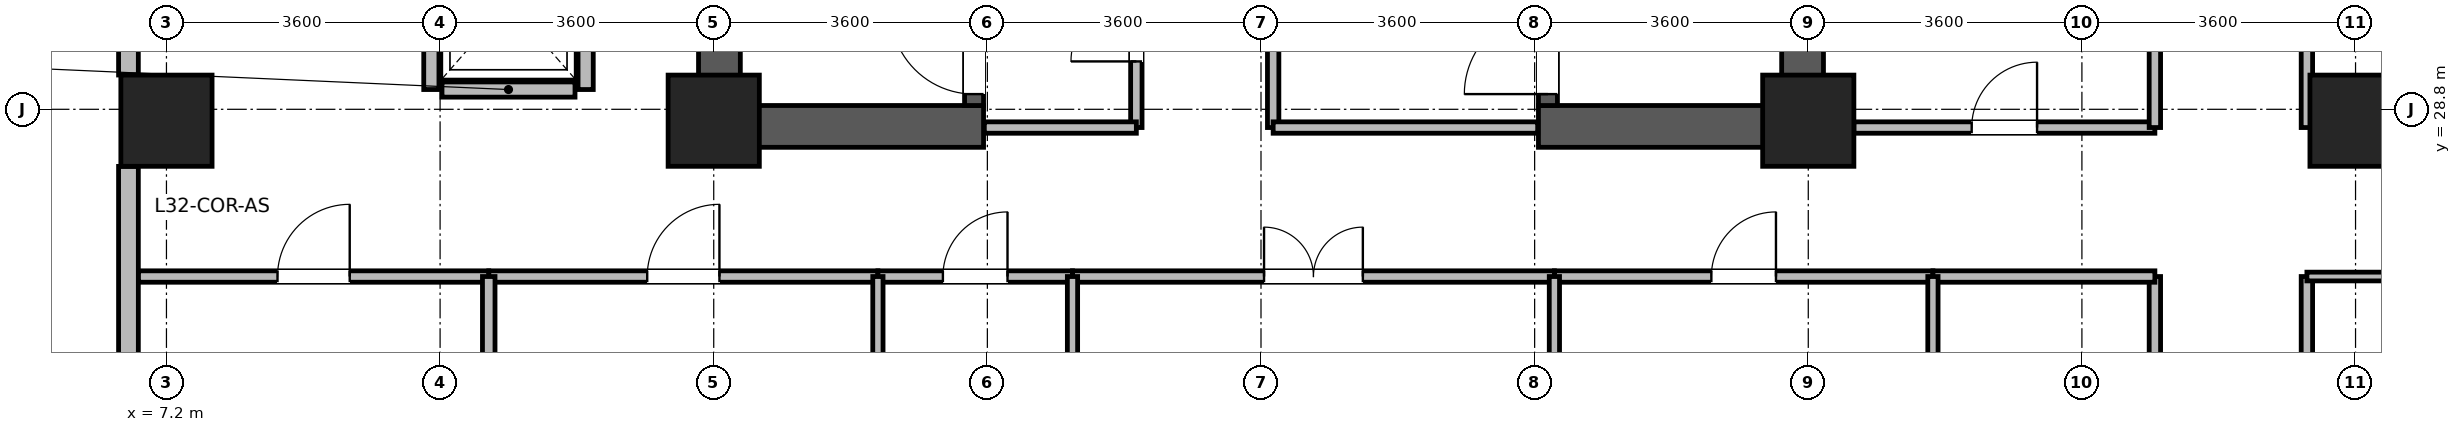
"""IFC4 building model, lengths in metres.
Left out: names, types, materials, properties, quantities, classifications, styles, units other than length and angle.
Written with IfcOpenShell. Run it as: python <this file> out.ifc"""

import sys

from ifc_helpers import new_model, si_unit, direction, frame, frame_2d, origin, origin_2d, place, context, subcontext, project, spatial, rectangle, extrude, source, transform, mapped, element, fill, save


model = new_model("IFC4")
c1 = context("Model", 3, precision=1e-05, world=origin(), true_north=direction((0.0, 1.0)))
c2 = subcontext(c1, "Body", "Model", "MODEL_VIEW")
j1 = project(units=[si_unit("LENGTHUNIT", "METRE"), si_unit("PLANEANGLEUNIT", "RADIAN")], contexts=[c1])
p1 = place(None, origin())
s1 = spatial("IfcSite", under=j1, at=p1, CompositionType="ELEMENT")
p2 = place(p1, origin())
s2 = spatial("IfcBuilding", under=s1, at=p2, CompositionType="ELEMENT")
p3 = place(p2, frame((0.0, 0.0, 126.7)))
s3 = spatial("IfcBuildingStorey", under=s2, at=p3, CompositionType="ELEMENT", Elevation=126.7)
for number, where, z_axis, x_axis in (
    (1, (14.475, 28.3, 0.0), (0.0, 0.0, 1.0), (0.0, 1.0, 0.0)),
    (2, (28.725, 28.3, 0.0), (0.0, 0.0, 1.0), (0.0, 1.0, 0.0)),
):
    element("IfcWall", number, at=place(p3, frame(where, z_axis=z_axis, x_axis=x_axis)), inside=s3, PredefinedType="SHEAR", context=c2, shape_type="SweptSolid", body=[
        extrude(rectangle(XDim=8.1, YDim=0.55, at=frame_2d((4.05, 0.0))), origin(), (0.0, 0.0, 1.0), 3.34),
    ])
for number, where, z_axis, x_axis in (
    (3, (14.75, 28.575, 0.0), (0.0, 0.0, 1.0), (1.0, 0.0, 0.0)),
    (4, (25.25, 28.575, 0.0), (0.0, 0.0, 1.0), (1.0, 0.0, 0.0)),
):
    element("IfcWall", number, at=place(p3, frame(where, z_axis=z_axis, x_axis=x_axis)), inside=s3, PredefinedType="SHEAR", context=c2, shape_type="SweptSolid", body=[
        extrude(rectangle(XDim=3.2, YDim=0.55, at=frame_2d((1.6, 0.0))), origin(), (0.0, 0.0, 1.0), 3.34),
    ])
p4 = place(p3, frame((17.825, 28.85, 0.0), z_axis=(0.0, 0.0, 1.0), x_axis=(0.0, 1.0, 0.0)))
e5 = element("IfcWall", 5, at=p4, inside=s3, PredefinedType="SHEAR", context=c2, shape_type="SweptSolid", body=[
    extrude(rectangle(XDim=7.0, YDim=0.25, at=frame_2d((3.5, 0.0))), origin(), (0.0, 0.0, 1.0), 3.34),
])
p5 = place(p4, frame((0.15, 0.0, 0.0)))
e6 = element("IfcOpeningElement", 6, at=p5, cuts=e5, PredefinedType="OPENING", context=c2, shape_type="SweptSolid", body=[
    extrude(rectangle(XDim=1.1, YDim=2.08, at=frame_2d((0.55, 1.04))), frame((0.0, 0.135, 0.0), z_axis=(0.0, -1.0, 0.0), x_axis=(1.0, 0.0, 0.0)), (0.0, 0.0, 1.0), 0.27),
])
p6 = place(p3, frame((25.375, 28.85, 0.0), z_axis=(0.0, 0.0, 1.0), x_axis=(0.0, 1.0, 0.0)))
e7 = element("IfcWall", 7, at=p6, inside=s3, PredefinedType="SHEAR", context=c2, shape_type="SweptSolid", body=[
    extrude(rectangle(XDim=7.0, YDim=0.25, at=frame_2d((3.5, 0.0))), origin(), (0.0, 0.0, 1.0), 3.34),
])
p7 = place(p6, frame((0.15, 0.0, 0.0)))
e8 = element("IfcOpeningElement", 8, at=p7, cuts=e7, PredefinedType="OPENING", context=c2, shape_type="SweptSolid", body=[
    extrude(rectangle(XDim=1.1, YDim=2.08, at=frame_2d((0.55, 1.04))), frame((0.0, 0.135, 0.0), z_axis=(0.0, -1.0, 0.0), x_axis=(1.0, 0.0, 0.0)), (0.0, 0.0, 1.0), 0.27),
])
m1 = source(origin(), c2, "Body", "SweptSolid", [
    extrude(rectangle(XDim=1.2, YDim=1.2, at=origin_2d()), origin(), (0.0, 0.0, 1.0), 3.7),
])
for number, where, z_axis, x_axis in (
    (9, (7.2, 28.65, 0.0), (0.0, 0.0, 1.0), (1.0, 0.0, 0.0)),
    (10, (14.4, 28.65, 0.0), (0.0, 0.0, 1.0), (1.0, 0.0, 0.0)),
    (11, (28.8, 28.65, 0.0), (0.0, 0.0, 1.0), (1.0, 0.0, 0.0)),
    (12, (36.0, 28.65, 0.0), (0.0, 0.0, 1.0), (1.0, 0.0, 0.0)),
):
    element("IfcColumn", number, at=place(p3, frame(where, z_axis=z_axis, x_axis=x_axis)), inside=s3, PredefinedType="COLUMN", context=c2, shape_type="MappedRepresentation", body=[
        mapped(m1, transform((0.0, 0.0, 0.0), x_axis=(1.0, 0.0, 0.0), y_axis=(0.0, 1.0, 0.0), z_axis=(0.0, 0.0, 1.0), scale=1.0)),
    ])
p8 = place(p3, frame((6.7, 29.251, 0.0), z_axis=(0.0, 0.0, 1.0), x_axis=(0.0, 1.0, 0.0)))
e13 = element("IfcWall", 13, at=p8, inside=s3, PredefinedType="STANDARD", context=c2, shape_type="SweptSolid", body=[
    extrude(rectangle(XDim=6.298, YDim=0.26, at=frame_2d((3.149, 0.0))), origin(), (0.0, 0.0, 1.0), 3.32),
])
p9 = place(p8, frame((0.824, 0.0, 0.85)))
e14 = element("IfcOpeningElement", 14, at=p9, cuts=e13, PredefinedType="OPENING", context=c2, shape_type="SweptSolid", body=[
    extrude(rectangle(XDim=1.5, YDim=1.85, at=frame_2d((0.75, 0.925))), frame((0.0, 0.14, 0.0), z_axis=(0.0, -1.0, 0.0), x_axis=(1.0, 0.0, 0.0)), (0.0, 0.0, 1.0), 0.28),
])
p10 = place(p8, frame((3.973, 0.0, 0.85)))
e15 = element("IfcOpeningElement", 15, at=p10, cuts=e13, PredefinedType="OPENING", context=c2, shape_type="SweptSolid", body=[
    extrude(rectangle(XDim=1.5, YDim=1.85, at=frame_2d((0.75, 0.925))), frame((0.0, 0.14, 0.0), z_axis=(0.0, -1.0, 0.0), x_axis=(1.0, 0.0, 0.0)), (0.0, 0.0, 1.0), 0.28),
])
p11 = place(p3, frame((6.7, 21.47, 0.0), z_axis=(0.0, 0.0, 1.0), x_axis=(0.0, 1.0, 0.0)))
e16 = element("IfcWall", 16, at=p11, inside=s3, PredefinedType="STANDARD", context=c2, shape_type="SweptSolid", body=[
    extrude(rectangle(XDim=6.579, YDim=0.26, at=frame_2d((3.29, 0.0))), origin(), (0.0, 0.0, 1.0), 3.32),
])
p12 = place(p11, frame((0.895, 0.0, 0.85)))
e17 = element("IfcOpeningElement", 17, at=p12, cuts=e16, PredefinedType="OPENING", context=c2, shape_type="SweptSolid", body=[
    extrude(rectangle(XDim=1.5, YDim=1.85, at=frame_2d((0.75, 0.925))), frame((0.0, 0.14, 0.0), z_axis=(0.0, -1.0, 0.0), x_axis=(1.0, 0.0, 0.0)), (0.0, 0.0, 1.0), 0.28),
])
p13 = place(p11, frame((2.814, 0.0, 0.85)))
e18 = element("IfcOpeningElement", 18, at=p13, cuts=e16, PredefinedType="OPENING", context=c2, shape_type="SweptSolid", body=[
    extrude(rectangle(XDim=0.95, YDim=1.75, at=frame_2d((0.475, 0.875))), frame((0.0, 0.14, 0.0), z_axis=(0.0, -1.0, 0.0), x_axis=(1.0, 0.0, 0.0)), (0.0, 0.0, 1.0), 0.28),
])
p14 = place(p3, frame((10.825, 29.06, 0.0), z_axis=(0.0, 0.0, 1.0), x_axis=(1.0, 0.0, 0.0)))
e19 = element("IfcWall", 19, at=p14, inside=s3, PredefinedType="PARTITIONING", context=c2, shape_type="SweptSolid", body=[
    extrude(rectangle(XDim=1.75, YDim=0.2, at=frame_2d((0.875, 0.0))), origin(), (0.0, 0.0, 1.0), 3.32),
])
for number, where, z_axis, x_axis in (
    (20, (10.685, 29.06, 0.0), (0.0, 0.0, 1.0), (0.0, 1.0, 0.0)),
    (21, (12.715, 29.06, 0.0), (0.0, 0.0, 1.0), (0.0, 1.0, 0.0)),
):
    element("IfcWall", number, at=place(p3, frame(where, z_axis=z_axis, x_axis=x_axis)), inside=s3, PredefinedType="PARTITIONING", context=c2, shape_type="SweptSolid", body=[
        extrude(rectangle(XDim=2.28, YDim=0.2, at=frame_2d((1.14, 0.0))), origin(), (0.0, 0.0, 1.0), 3.32),
    ])
p15 = place(p3, frame((35.36, 16.96, 0.0), z_axis=(0.0, 0.0, 1.0), x_axis=(0.0, 1.0, 0.0)))
e22 = element("IfcWall", 22, at=p15, inside=s3, PredefinedType="PARTITIONING", context=c2, shape_type="SweptSolid", body=[
    extrude(rectangle(XDim=9.64, YDim=0.15, at=frame_2d((4.82, 0.0))), origin(), (0.0, 0.0, 1.0), 3.32),
])
p16 = place(p15, frame((2.435, 0.0, 0.0)))
e23 = element("IfcOpeningElement", 23, at=p16, cuts=e22, PredefinedType="OPENING", context=c2, shape_type="SweptSolid", body=[
    extrude(rectangle(XDim=1.3, YDim=2.12, at=frame_2d((0.65, 1.06))), frame((0.0, 0.085, 0.0), z_axis=(0.0, -1.0, 0.0), x_axis=(1.0, 0.0, 0.0)), (0.0, 0.0, 1.0), 0.17),
])
p17 = place(p3, frame((35.36, 28.56, 0.0), z_axis=(0.0, 0.0, 1.0), x_axis=(0.0, 1.0, 0.0)))
e24 = element("IfcWall", 24, at=p17, inside=s3, PredefinedType="PARTITIONING", context=c2, shape_type="SweptSolid", body=[
    extrude(rectangle(XDim=7.68, YDim=0.15, at=frame_2d((3.84, 0.0))), origin(), (0.0, 0.0, 1.0), 3.32),
])
p18 = place(p17, frame((3.19, 0.0, 0.0)))
e25 = element("IfcOpeningElement", 25, at=p18, cuts=e24, PredefinedType="OPENING", context=c2, shape_type="SweptSolid", body=[
    extrude(rectangle(XDim=1.3, YDim=2.12, at=frame_2d((0.65, 1.06))), frame((0.0, 0.085, 0.0), z_axis=(0.0, -1.0, 0.0), x_axis=(1.0, 0.0, 0.0)), (0.0, 0.0, 1.0), 0.17),
])
p19 = place(p3, frame((19.12, 26.6, 0.0), z_axis=(0.0, 0.0, 1.0), x_axis=(1.0, 0.0, 0.0)))
e26 = element("IfcWall", 26, at=p19, inside=s3, PredefinedType="PARTITIONING", context=c2, shape_type="SweptSolid", body=[
    extrude(rectangle(XDim=6.34, YDim=0.15, at=frame_2d((3.17, 0.0))), origin(), (0.0, 0.0, 1.0), 3.32),
])
p20 = place(p19, frame((2.52, 0.0, 0.0)))
e27 = element("IfcOpeningElement", 27, at=p20, cuts=e26, PredefinedType="OPENING", context=c2, shape_type="SweptSolid", body=[
    extrude(rectangle(XDim=1.3, YDim=2.12, at=frame_2d((0.65, 1.06))), frame((0.0, 0.085, 0.0), z_axis=(0.0, -1.0, 0.0), x_axis=(1.0, 0.0, 0.0)), (0.0, 0.0, 1.0), 0.17),
])
p21 = place(p3, frame((11.44, 26.6, 0.0), z_axis=(0.0, 0.0, 1.0), x_axis=(1.0, 0.0, 0.0)))
e28 = element("IfcWall", 28, at=p21, inside=s3, PredefinedType="PARTITIONING", context=c2, shape_type="SweptSolid", body=[
    extrude(rectangle(XDim=5.12, YDim=0.15, at=frame_2d((2.56, 0.0))), origin(), (0.0, 0.0, 1.0), 3.32),
])
p22 = place(p21, frame((2.085, 0.0, 0.0)))
e29 = element("IfcOpeningElement", 29, at=p22, cuts=e28, PredefinedType="OPENING", context=c2, shape_type="SweptSolid", body=[
    extrude(rectangle(XDim=0.95, YDim=2.1, at=frame_2d((0.475, 1.05))), frame((0.0, 0.085, 0.0), z_axis=(0.0, -1.0, 0.0), x_axis=(1.0, 0.0, 0.0)), (0.0, 0.0, 1.0), 0.17),
])
p23 = place(p3, frame((33.36, 21.6, 0.0), z_axis=(0.0, 0.0, 1.0), x_axis=(0.0, 1.0, 0.0)))
e30 = element("IfcWall", 30, at=p23, inside=s3, PredefinedType="PARTITIONING", context=c2, shape_type="SweptSolid", body=[
    extrude(rectangle(XDim=5.0, YDim=0.15, at=frame_2d((2.5, 0.0))), origin(), (0.0, 0.0, 1.0), 3.32),
])
p24 = place(p23, frame((2.07, 0.0, 0.0)))
e31 = element("IfcOpeningElement", 31, at=p24, cuts=e30, PredefinedType="OPENING", context=c2, shape_type="SweptSolid", body=[
    extrude(rectangle(XDim=0.86, YDim=2.02, at=frame_2d((0.43, 1.01))), frame((0.0, 0.085, 0.0), z_axis=(0.0, -1.0, 0.0), x_axis=(1.0, 0.0, 0.0)), (0.0, 0.0, 1.0), 0.17),
])
p25 = place(p3, frame((25.46, 26.6, 0.0), z_axis=(0.0, 0.0, 1.0), x_axis=(1.0, 0.0, 0.0)))
e32 = element("IfcWall", 32, at=p25, inside=s3, PredefinedType="PARTITIONING", context=c2, shape_type="SweptSolid", body=[
    extrude(rectangle(XDim=4.98, YDim=0.15, at=frame_2d((2.49, 0.0))), origin(), (0.0, 0.0, 1.0), 3.32),
])
p26 = place(p25, frame((2.065, 0.0, 0.0)))
e33 = element("IfcOpeningElement", 33, at=p26, cuts=e32, PredefinedType="OPENING", context=c2, shape_type="SweptSolid", body=[
    extrude(rectangle(XDim=0.85, YDim=2.04, at=frame_2d((0.425, 1.02))), frame((0.0, 0.085, 0.0), z_axis=(0.0, -1.0, 0.0), x_axis=(1.0, 0.0, 0.0)), (0.0, 0.0, 1.0), 0.17),
])
p27 = place(p3, frame((6.832, 26.6, 0.0), z_axis=(0.0, 0.0, 1.0), x_axis=(1.0, 0.0, 0.0)))
e34 = element("IfcWall", 34, at=p27, inside=s3, PredefinedType="PARTITIONING", context=c2, shape_type="SweptSolid", body=[
    extrude(rectangle(XDim=4.608, YDim=0.15, at=frame_2d((2.304, 0.0))), origin(), (0.0, 0.0, 1.0), 3.32),
])
p28 = place(p27, frame((1.829, 0.0, 0.0)))
e35 = element("IfcOpeningElement", 35, at=p28, cuts=e34, PredefinedType="OPENING", context=c2, shape_type="SweptSolid", body=[
    extrude(rectangle(XDim=0.95, YDim=2.1, at=frame_2d((0.475, 1.05))), frame((0.0, 0.085, 0.0), z_axis=(0.0, -1.0, 0.0), x_axis=(1.0, 0.0, 0.0)), (0.0, 0.0, 1.0), 0.17),
])
p29 = place(p3, frame((29.4, 28.56, 0.0), z_axis=(0.0, 0.0, 1.0), x_axis=(1.0, 0.0, 0.0)))
e36 = element("IfcWall", 36, at=p29, inside=s3, PredefinedType="PARTITIONING", context=c2, shape_type="SweptSolid", body=[
    extrude(rectangle(XDim=3.96, YDim=0.15, at=frame_2d((1.98, 0.0))), origin(), (0.0, 0.0, 1.0), 2.67),
])
p30 = place(p29, frame((1.55, 0.0, 0.0)))
e37 = element("IfcOpeningElement", 37, at=p30, cuts=e36, PredefinedType="OPENING", context=c2, shape_type="SweptSolid", body=[
    extrude(rectangle(XDim=0.86, YDim=2.02, at=frame_2d((0.43, 1.01))), frame((0.0, 0.085, 0.0), z_axis=(0.0, -1.0, 0.0), x_axis=(1.0, 0.0, 0.0)), (0.0, 0.0, 1.0), 0.17),
])
p31 = place(p3, frame((33.36, 28.56, 0.0), z_axis=(0.0, 0.0, 1.0), x_axis=(0.0, 1.0, 0.0)))
e38 = element("IfcWall", 38, at=p31, inside=s3, PredefinedType="PARTITIONING", context=c2, shape_type="SweptSolid", body=[
    extrude(rectangle(XDim=3.84, YDim=0.15, at=frame_2d((1.92, 0.0))), origin(), (0.0, 0.0, 1.0), 3.32),
])
p32 = place(p3, frame((30.44, 26.6, 0.0), z_axis=(0.0, 0.0, 1.0), x_axis=(1.0, 0.0, 0.0)))
e39 = element("IfcWall", 39, at=p32, inside=s3, PredefinedType="PARTITIONING", context=c2, shape_type="SweptSolid", body=[
    extrude(rectangle(XDim=2.92, YDim=0.15, at=frame_2d((1.46, 0.0))), origin(), (0.0, 0.0, 1.0), 3.32),
])
p33 = place(p3, frame((19.96, 28.56, 0.0), z_axis=(0.0, 0.0, 1.0), x_axis=(0.0, 1.0, 0.0)))
e40 = element("IfcWall", 40, at=p33, inside=s3, PredefinedType="PARTITIONING", context=c2, shape_type="SweptSolid", body=[
    extrude(rectangle(XDim=2.6, YDim=0.15, at=frame_2d((1.3, 0.0))), origin(), (0.0, 0.0, 1.0), 3.32),
])
p34 = place(p33, frame((0.87, 0.0, 0.0)))
e41 = element("IfcOpeningElement", 41, at=p34, cuts=e40, PredefinedType="OPENING", context=c2, shape_type="SweptSolid", body=[
    extrude(rectangle(XDim=0.86, YDim=2.02, at=frame_2d((0.43, 1.01))), frame((0.0, 0.085, 0.0), z_axis=(0.0, -1.0, 0.0), x_axis=(1.0, 0.0, 0.0)), (0.0, 0.0, 1.0), 0.17),
])
p35 = place(p3, frame((16.56, 26.6, 0.0), z_axis=(0.0, 0.0, 1.0), x_axis=(1.0, 0.0, 0.0)))
e42 = element("IfcWall", 42, at=p35, inside=s3, PredefinedType="PARTITIONING", context=c2, shape_type="SweptSolid", body=[
    extrude(rectangle(XDim=2.56, YDim=0.15, at=frame_2d((1.28, 0.0))), origin(), (0.0, 0.0, 1.0), 3.32),
])
p36 = place(p35, frame((0.855, 0.0, 0.0)))
e43 = element("IfcOpeningElement", 43, at=p36, cuts=e42, PredefinedType="OPENING", context=c2, shape_type="SweptSolid", body=[
    extrude(rectangle(XDim=0.85, YDim=2.04, at=frame_2d((0.425, 1.02))), frame((0.0, 0.085, 0.0), z_axis=(0.0, -1.0, 0.0), x_axis=(1.0, 0.0, 0.0)), (0.0, 0.0, 1.0), 0.17),
])
p37 = place(p3, frame((17.96, 28.56, 0.0), z_axis=(0.0, 0.0, 1.0), x_axis=(1.0, 0.0, 0.0)))
e44 = element("IfcWall", 44, at=p37, inside=s3, PredefinedType="PARTITIONING", context=c2, shape_type="SweptSolid", body=[
    extrude(rectangle(XDim=2.0, YDim=0.15, at=frame_2d((1.0, 0.0))), origin(), (0.0, 0.0, 1.0), 2.32),
])
p38 = place(p3, frame((11.44, 21.732, 0.0), z_axis=(0.0, 0.0, 1.0), x_axis=(0.0, 1.0, 0.0)))
e45 = element("IfcWall", 45, at=p38, inside=s3, PredefinedType="PARTITIONING", context=c2, shape_type="SweptSolid", body=[
    extrude(rectangle(XDim=4.868, YDim=0.165, at=frame_2d((2.434, 0.0))), origin(), (0.0, 0.0, 1.0), 3.32),
])
for number, where, z_axis, x_axis in (
    (46, (16.56, 21.732, 0.0), (0.0, 0.0, 1.0), (0.0, 1.0, 0.0)),
    (47, (19.12, 21.732, 0.0), (0.0, 0.0, 1.0), (0.0, 1.0, 0.0)),
    (48, (25.46, 21.732, 0.0), (0.0, 0.0, 1.0), (0.0, 1.0, 0.0)),
    (49, (30.44, 21.732, 0.0), (0.0, 0.0, 1.0), (0.0, 1.0, 0.0)),
):
    element("IfcWall", number, at=place(p3, frame(where, z_axis=z_axis, x_axis=x_axis)), inside=s3, PredefinedType="PARTITIONING", context=c2, shape_type="SweptSolid", body=[
        extrude(rectangle(XDim=4.868, YDim=0.135, at=frame_2d((2.434, 0.0))), origin(), (0.0, 0.0, 1.0), 3.32),
    ])
p39 = place(p3, frame((21.76, 28.56, 0.0), z_axis=(0.0, 0.0, 1.0), x_axis=(0.0, 1.0, 0.0)))
e50 = element("IfcWall", 50, at=p39, inside=s3, PredefinedType="PARTITIONING", context=c2, shape_type="SweptSolid", body=[
    extrude(rectangle(XDim=4.6, YDim=0.15, at=frame_2d((2.3, 0.0))), origin(), (0.0, 0.0, 1.0), 3.32),
])
p40 = place(p39, frame((1.55, 0.0, 0.0)))
e51 = element("IfcOpeningElement", 51, at=p40, cuts=e50, PredefinedType="OPENING", context=c2, shape_type="SweptSolid", body=[
    extrude(rectangle(XDim=1.5, YDim=2.1, at=frame_2d((0.75, 1.05))), frame((0.0, 0.085, 0.0), z_axis=(0.0, -1.0, 0.0), x_axis=(1.0, 0.0, 0.0)), (0.0, 0.0, 1.0), 0.17),
])
p41 = place(p3, frame((21.76, 28.56, 0.0), z_axis=(0.0, 0.0, 1.0), x_axis=(1.0, 0.0, 0.0)))
e52 = element("IfcWall", 52, at=p41, inside=s3, PredefinedType="PARTITIONING", context=c2, shape_type="SweptSolid", body=[
    extrude(rectangle(XDim=3.48, YDim=0.15, at=frame_2d((1.74, 0.0))), origin(), (0.0, 0.0, 1.0), 2.32),
])
p42 = place(p3, frame((35.36, 26.6, 0.0), z_axis=(0.0, 0.0, 1.0), x_axis=(1.0, 0.0, 0.0)))
e53 = element("IfcWall", 53, at=p42, inside=s3, PredefinedType="PARTITIONING", context=c2, shape_type="SweptSolid", body=[
    extrude(rectangle(XDim=3.26, YDim=0.115, at=frame_2d((1.63, 0.0))), origin(), (0.0, 0.0, 1.0), 3.32),
])
p43 = place(p5, origin())
e54 = element("IfcDoor", 54, at=p43, inside=s3, OperationType="SINGLE_SWING_RIGHT", PredefinedType="DOOR", context=c2, shape_type="SweptSolid", body=[
    extrude(rectangle(XDim=1.1, YDim=2.08, at=frame_2d((0.55, 1.04))), frame((0.0, 0.025, 0.0), z_axis=(0.0, -1.0, 0.0), x_axis=(1.0, 0.0, 0.0)), (0.0, 0.0, 1.0), 0.05),
])
fill(e6, e54)
p44 = place(p7, origin())
e55 = element("IfcDoor", 55, at=p44, inside=s3, OperationType="SINGLE_SWING_LEFT", PredefinedType="DOOR", context=c2, shape_type="SweptSolid", body=[
    extrude(rectangle(XDim=1.1, YDim=2.08, at=frame_2d((0.55, 1.04))), frame((0.0, 0.025, 0.0), z_axis=(0.0, -1.0, 0.0), x_axis=(1.0, 0.0, 0.0)), (0.0, 0.0, 1.0), 0.05),
])
fill(e8, e55)
p45 = place(p20, origin())
e56 = element("IfcDoor", 56, at=p45, inside=s3, OperationType="DOUBLE_DOOR_SINGLE_SWING", PredefinedType="DOOR", context=c2, shape_type="SweptSolid", body=[
    extrude(rectangle(XDim=1.3, YDim=2.12, at=frame_2d((0.65, 1.06))), frame((0.0, 0.025, 0.0), z_axis=(0.0, -1.0, 0.0), x_axis=(1.0, 0.0, 0.0)), (0.0, 0.0, 1.0), 0.05),
])
fill(e27, e56)
p46 = place(p22, origin())
e57 = element("IfcDoor", 57, at=p46, inside=s3, OperationType="SINGLE_SWING_RIGHT", PredefinedType="DOOR", context=c2, shape_type="SweptSolid", body=[
    extrude(rectangle(XDim=0.95, YDim=2.1, at=frame_2d((0.475, 1.05))), frame((0.0, 0.025, 0.0), z_axis=(0.0, -1.0, 0.0), x_axis=(1.0, 0.0, 0.0)), (0.0, 0.0, 1.0), 0.05),
])
fill(e29, e57)
p47 = place(p26, origin())
e58 = element("IfcDoor", 58, at=p47, inside=s3, OperationType="SINGLE_SWING_RIGHT", PredefinedType="DOOR", context=c2, shape_type="SweptSolid", body=[
    extrude(rectangle(XDim=0.85, YDim=2.04, at=frame_2d((0.425, 1.02))), frame((0.0, 0.025, 0.0), z_axis=(0.0, -1.0, 0.0), x_axis=(1.0, 0.0, 0.0)), (0.0, 0.0, 1.0), 0.05),
])
fill(e33, e58)
p48 = place(p28, origin())
e59 = element("IfcDoor", 59, at=p48, inside=s3, OperationType="SINGLE_SWING_RIGHT", PredefinedType="DOOR", context=c2, shape_type="SweptSolid", body=[
    extrude(rectangle(XDim=0.95, YDim=2.1, at=frame_2d((0.475, 1.05))), frame((0.0, 0.025, 0.0), z_axis=(0.0, -1.0, 0.0), x_axis=(1.0, 0.0, 0.0)), (0.0, 0.0, 1.0), 0.05),
])
fill(e35, e59)
p49 = place(p30, origin())
e60 = element("IfcDoor", 60, at=p49, inside=s3, OperationType="SINGLE_SWING_RIGHT", PredefinedType="DOOR", context=c2, shape_type="SweptSolid", body=[
    extrude(rectangle(XDim=0.86, YDim=2.02, at=frame_2d((0.43, 1.01))), frame((0.0, 0.025, 0.0), z_axis=(0.0, -1.0, 0.0), x_axis=(1.0, 0.0, 0.0)), (0.0, 0.0, 1.0), 0.05),
])
fill(e37, e60)
p50 = place(p34, origin())
e61 = element("IfcDoor", 61, at=p50, inside=s3, OperationType="SINGLE_SWING_LEFT", PredefinedType="DOOR", context=c2, shape_type="SweptSolid", body=[
    extrude(rectangle(XDim=0.86, YDim=2.02, at=frame_2d((0.43, 1.01))), frame((0.0, 0.025, 0.0), z_axis=(0.0, -1.0, 0.0), x_axis=(1.0, 0.0, 0.0)), (0.0, 0.0, 1.0), 0.05),
])
fill(e41, e61)
p51 = place(p36, origin())
e62 = element("IfcDoor", 62, at=p51, inside=s3, OperationType="SINGLE_SWING_RIGHT", PredefinedType="DOOR", context=c2, shape_type="SweptSolid", body=[
    extrude(rectangle(XDim=0.85, YDim=2.04, at=frame_2d((0.425, 1.02))), frame((0.0, 0.025, 0.0), z_axis=(0.0, -1.0, 0.0), x_axis=(1.0, 0.0, 0.0)), (0.0, 0.0, 1.0), 0.05),
])
fill(e43, e62)
save(model, sys.argv[1])
